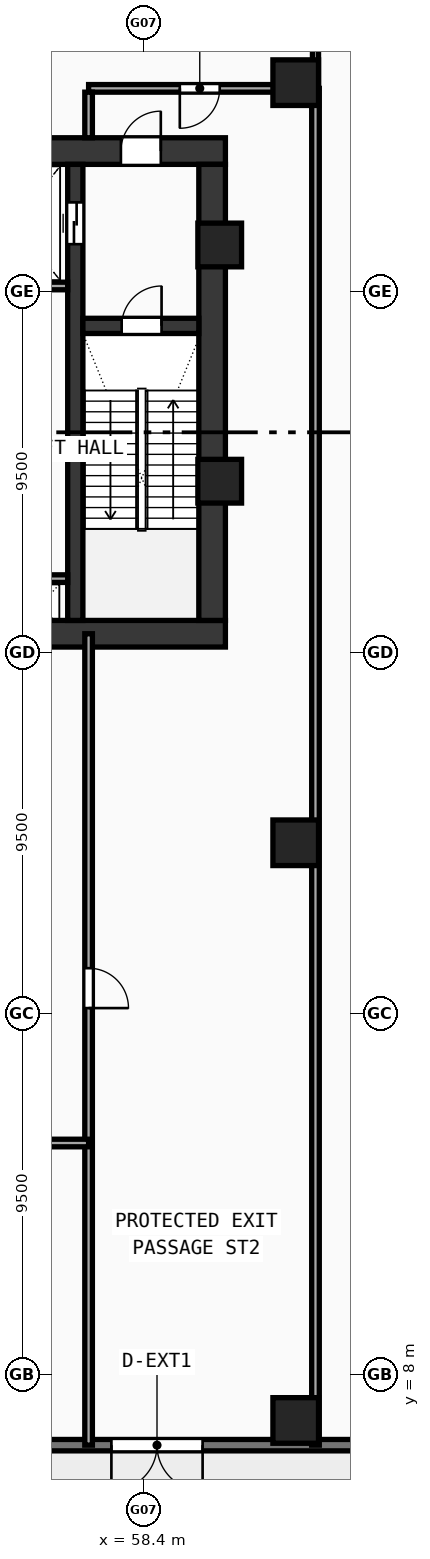
"""IFC4 building model, lengths in metres.
Left out: names, types, materials, properties, quantities, classifications, styles, units other than length and angle.
Written with IfcOpenShell. Run it as: python <this file> out.ifc"""

import sys

from ifc_helpers import new_model, si_unit, direction, frame, frame_2d, origin, origin_with_axes, origin_2d, place, context, subcontext, project, spatial, rectangle, hollow_rectangle, extrude, source, transform, mapped, element, fill, save


model = new_model("IFC4")
c1 = context("Model", 3, precision=1e-05, world=origin(), true_north=direction((0.0, 1.0)))
c2 = subcontext(c1, "Body", "Model", "MODEL_VIEW")
j1 = project(units=[si_unit("LENGTHUNIT", "METRE"), si_unit("PLANEANGLEUNIT", "RADIAN")], contexts=[c1])
p1 = place(None, origin())
s1 = spatial("IfcSite", under=j1, at=p1, CompositionType="ELEMENT")
p2 = place(p1, origin())
s2 = spatial("IfcBuilding", under=s1, at=p2, CompositionType="ELEMENT")
p3 = place(p2, origin())
s3 = spatial("IfcBuildingStorey", under=s2, at=p3, CompositionType="ELEMENT", Elevation=0.0)
p4 = place(p3, frame((35.45, 27.5, 0.0), z_axis=(0.0, 0.0, 1.0), x_axis=(1.0, 0.0, 0.0)))
e1 = element("IfcWall", 1, at=p4, inside=s3, PredefinedType="SHEAR", context=c2, shape_type="SweptSolid", body=[
    extrude(rectangle(XDim=25.1, YDim=0.7, at=frame_2d((12.55, 0.0))), origin(), (0.0, 0.0, 1.0), 4.52),
])
p5 = place(p3, frame((49.2, 40.2, 0.0), z_axis=(0.0, 0.0, 1.0), x_axis=(1.0, 0.0, 0.0)))
e2 = element("IfcWall", 2, at=p5, inside=s3, PredefinedType="SHEAR", context=c2, shape_type="SweptSolid", body=[
    extrude(rectangle(XDim=11.35, YDim=0.7, at=frame_2d((5.675, 0.0))), origin(), (0.0, 0.0, 1.0), 4.52),
])
p6 = place(p5, frame((8.6, 0.0, 0.0)))
e3 = element("IfcOpeningElement", 3, at=p6, cuts=e2, PredefinedType="OPENING", context=c2, shape_type="SweptSolid", body=[
    extrude(rectangle(XDim=1.05, YDim=2.1, at=frame_2d((0.525, 1.05))), frame((0.0, 0.36, 0.0), z_axis=(0.0, -1.0, 0.0), x_axis=(1.0, 0.0, 0.0)), (0.0, 0.0, 1.0), 0.72),
])
p7 = place(p3, frame((60.2, 27.85, 0.0), z_axis=(0.0, 0.0, 1.0), x_axis=(0.0, 1.0, 0.0)))
e4 = element("IfcWall", 4, at=p7, inside=s3, PredefinedType="SHEAR", context=c2, shape_type="SweptSolid", body=[
    extrude(rectangle(XDim=12.0, YDim=0.7, at=frame_2d((6.0, 0.0))), origin(), (0.0, 0.0, 1.0), 4.52),
])
p8 = place(p3, frame((56.6, 27.85, 0.0), z_axis=(0.0, 0.0, 1.0), x_axis=(0.0, 1.0, 0.0)))
e5 = element("IfcWall", 5, at=p8, inside=s3, PredefinedType="SHEAR", context=c2, shape_type="SweptSolid", body=[
    extrude(rectangle(XDim=12.0, YDim=0.4, at=frame_2d((6.0, 0.0))), origin(), (0.0, 0.0, 1.0), 4.52),
])
p9 = place(p8, frame((9.9, 0.0, 0.0)))
e6 = element("IfcOpeningElement", 6, at=p9, cuts=e5, PredefinedType="OPENING", context=c2, shape_type="SweptSolid", body=[
    extrude(rectangle(XDim=1.1, YDim=2.1, at=frame_2d((0.55, 1.05))), frame((0.0, 0.21, 0.0), z_axis=(0.0, -1.0, 0.0), x_axis=(1.0, 0.0, 0.0)), (0.0, 0.0, 1.0), 0.42),
])
p10 = place(p3, frame((56.8, 35.6, 0.0), z_axis=(0.0, 0.0, 1.0), x_axis=(1.0, 0.0, 0.0)))
e7 = element("IfcWall", 7, at=p10, inside=s3, PredefinedType="SHEAR", context=c2, shape_type="SweptSolid", body=[
    extrude(rectangle(XDim=3.05, YDim=0.4, at=frame_2d((1.525, 0.0))), origin(), (0.0, 0.0, 1.0), 4.52),
])
p11 = place(p10, frame((1.02, 0.0, 0.0)))
e8 = element("IfcOpeningElement", 8, at=p11, cuts=e7, PredefinedType="OPENING", context=c2, shape_type="SweptSolid", body=[
    extrude(rectangle(XDim=1.05, YDim=2.1, at=frame_2d((0.525, 1.05))), frame((0.0, 0.21, 0.0), z_axis=(0.0, -1.0, 0.0), x_axis=(1.0, 0.0, 0.0)), (0.0, 0.0, 1.0), 0.42),
])
m1 = source(origin(), c2, "Body", "SweptSolid", [
    extrude(hollow_rectangle(XDim=1.15, YDim=1.15, WallThickness=0.048, at=origin_2d()), origin(), (0.0, 0.0, 1.0), 4.8),
])
for number, where, z_axis, x_axis in (
    (9, (60.4, 31.513, -0.28), (0.0, 0.0, 1.0), (1.0, 0.0, 0.0)),
    (10, (60.4, 37.729, -0.28), (0.0, 0.0, 1.0), (1.0, 0.0, 0.0)),
):
    element("IfcColumn", number, at=place(p3, frame(where, z_axis=z_axis, x_axis=x_axis)), inside=s3, PredefinedType="COLUMN", context=c2, shape_type="MappedRepresentation", body=[
        mapped(m1, transform((0.0, 0.0, 0.0), scale=1.0)),
    ])
m2 = source(origin(), c2, "Body", "SweptSolid", [
    extrude(hollow_rectangle(XDim=1.2, YDim=1.2, WallThickness=0.05, at=origin_2d()), origin(), (0.0, 0.0, 1.0), 4.8),
])
for number, where, z_axis, x_axis in (
    (11, (62.4, 6.8, -0.28), (0.0, 0.0, 1.0), (1.0, 0.0, 0.0)),
    (12, (62.4, 22.0, -0.28), (0.0, 0.0, 1.0), (1.0, 0.0, 0.0)),
    (13, (62.4, 42.0, -0.28), (0.0, 0.0, 1.0), (1.0, 0.0, 0.0)),
):
    element("IfcColumn", number, at=place(p3, frame(where, z_axis=z_axis, x_axis=x_axis)), inside=s3, PredefinedType="COLUMN", context=c2, shape_type="MappedRepresentation", body=[
        mapped(m2, transform((0.0, 0.0, 0.0), scale=1.0)),
    ])
p12 = place(p3, frame((4.0, 6.15, 0.0), z_axis=(0.0, 0.0, 1.0), x_axis=(1.0, 0.0, 0.0)))
e14 = element("IfcWall", 14, at=p12, inside=s3, PredefinedType="STANDARD", context=c2, shape_type="SweptSolid", body=[
    extrude(rectangle(XDim=88.0, YDim=0.3, at=frame_2d((44.0, 0.0))), origin(), (0.0, 0.0, 1.0), 4.52),
])
p13 = place(p12, frame((32.05, 0.0, 0.0)))
e15 = element("IfcOpeningElement", 15, at=p13, cuts=e14, PredefinedType="OPENING", context=c2, shape_type="SweptSolid", body=[
    extrude(rectangle(XDim=2.4, YDim=2.2, at=frame_2d((1.2, 1.1))), frame((0.0, 0.16, 0.0), z_axis=(0.0, -1.0, 0.0), x_axis=(1.0, 0.0, 0.0)), (0.0, 0.0, 1.0), 0.32),
])
p14 = place(p12, frame((53.55, 0.0, 0.0)))
e16 = element("IfcOpeningElement", 16, at=p14, cuts=e14, PredefinedType="OPENING", context=c2, shape_type="SweptSolid", body=[
    extrude(rectangle(XDim=2.4, YDim=2.2, at=frame_2d((1.2, 1.1))), frame((0.0, 0.16, 0.0), z_axis=(0.0, -1.0, 0.0), x_axis=(1.0, 0.0, 0.0)), (0.0, 0.0, 1.0), 0.32),
])
p15 = place(p12, frame((68.0, 0.0, 0.0)))
e17 = element("IfcOpeningElement", 17, at=p15, cuts=e14, PredefinedType="OPENING", context=c2, shape_type="SweptSolid", body=[
    extrude(rectangle(XDim=2.4, YDim=2.2, at=frame_2d((1.2, 1.1))), frame((0.0, 0.16, 0.0), z_axis=(0.0, -1.0, 0.0), x_axis=(1.0, 0.0, 0.0)), (0.0, 0.0, 1.0), 0.32),
])
p16 = place(p12, frame((78.0, 0.0, 0.0)))
e18 = element("IfcOpeningElement", 18, at=p16, cuts=e14, PredefinedType="OPENING", context=c2, shape_type="SweptSolid", body=[
    extrude(rectangle(XDim=2.4, YDim=2.2, at=frame_2d((1.2, 1.1))), frame((0.0, 0.16, 0.0), z_axis=(0.0, -1.0, 0.0), x_axis=(1.0, 0.0, 0.0)), (0.0, 0.0, 1.0), 0.32),
])
p17 = place(p12, frame((9.0, 0.0, 0.9)))
e19 = element("IfcOpeningElement", 19, at=p17, cuts=e14, PredefinedType="OPENING", context=c2, shape_type="SweptSolid", body=[
    extrude(rectangle(XDim=2.4, YDim=1.8, at=frame_2d((1.2, 0.9))), frame((0.0, 0.16, 0.0), z_axis=(0.0, -1.0, 0.0), x_axis=(1.0, 0.0, 0.0)), (0.0, 0.0, 1.0), 0.32),
])
p18 = place(p12, frame((20.5, 0.0, 0.9)))
e20 = element("IfcOpeningElement", 20, at=p18, cuts=e14, PredefinedType="OPENING", context=c2, shape_type="SweptSolid", body=[
    extrude(rectangle(XDim=2.4, YDim=1.8, at=frame_2d((1.2, 0.9))), frame((0.0, 0.16, 0.0), z_axis=(0.0, -1.0, 0.0), x_axis=(1.0, 0.0, 0.0)), (0.0, 0.0, 1.0), 0.32),
])
p19 = place(p12, frame((39.0, 0.0, 0.9)))
e21 = element("IfcOpeningElement", 21, at=p19, cuts=e14, PredefinedType="OPENING", context=c2, shape_type="SweptSolid", body=[
    extrude(rectangle(XDim=2.4, YDim=1.8, at=frame_2d((1.2, 0.9))), frame((0.0, 0.16, 0.0), z_axis=(0.0, -1.0, 0.0), x_axis=(1.0, 0.0, 0.0)), (0.0, 0.0, 1.0), 0.32),
])
p20 = place(p12, frame((48.0, 0.0, 0.9)))
e22 = element("IfcOpeningElement", 22, at=p20, cuts=e14, PredefinedType="OPENING", context=c2, shape_type="SweptSolid", body=[
    extrude(rectangle(XDim=2.4, YDim=1.8, at=frame_2d((1.2, 0.9))), frame((0.0, 0.16, 0.0), z_axis=(0.0, -1.0, 0.0), x_axis=(1.0, 0.0, 0.0)), (0.0, 0.0, 1.0), 0.32),
])
p21 = place(p12, frame((61.5, 0.0, 0.9)))
e23 = element("IfcOpeningElement", 23, at=p21, cuts=e14, PredefinedType="OPENING", context=c2, shape_type="SweptSolid", body=[
    extrude(rectangle(XDim=2.4, YDim=1.8, at=frame_2d((1.2, 0.9))), frame((0.0, 0.16, 0.0), z_axis=(0.0, -1.0, 0.0), x_axis=(1.0, 0.0, 0.0)), (0.0, 0.0, 1.0), 0.32),
])
p22 = place(p3, frame((53.68, 36.65, 0.0), z_axis=(0.0, 0.0, 1.0), x_axis=(1.0, 0.0, 0.0)))
e24 = element("IfcWall", 24, at=p22, inside=s3, PredefinedType="SOLIDWALL", context=c2, shape_type="SweptSolid", body=[
    extrude(rectangle(XDim=2.72, YDim=0.2, at=frame_2d((1.36, 0.0))), origin(), (0.0, 0.0, 1.0), 4.52),
])
p23 = place(p3, frame((55.12, 28.95, 0.0), z_axis=(0.0, 0.0, 1.0), x_axis=(1.0, 0.0, 0.0)))
e25 = element("IfcWall", 25, at=p23, inside=s3, PredefinedType="SOLIDWALL", context=c2, shape_type="SweptSolid", body=[
    extrude(rectangle(XDim=1.28, YDim=0.2, at=frame_2d((0.64, 0.0))), origin(), (0.0, 0.0, 1.0), 4.52),
])
p24 = place(p3, frame((62.92, 6.15, 0.0), z_axis=(0.0, 0.0, 1.0), x_axis=(0.0, 1.0, 0.0)))
e26 = element("IfcWall", 26, at=p24, inside=s3, PredefinedType="SOLIDWALL", context=c2, shape_type="SweptSolid", body=[
    extrude(rectangle(XDim=35.7, YDim=0.2, at=frame_2d((17.85, 0.0))), origin(), (0.0, 0.0, 1.0), 3.62),
])
p25 = place(p3, frame((56.95, 41.85, 0.0), z_axis=(0.0, 0.0, 1.0), x_axis=(1.0, 0.0, 0.0)))
e27 = element("IfcWall", 27, at=p25, inside=s3, PredefinedType="SOLIDWALL", context=c2, shape_type="SweptSolid", body=[
    extrude(rectangle(XDim=5.97, YDim=0.2, at=frame_2d((2.985, 0.0))), origin(), (0.0, 0.0, 1.0), 3.62),
])
p26 = place(p25, frame((2.4, 0.0, 0.0)))
e28 = element("IfcOpeningElement", 28, at=p26, cuts=e27, PredefinedType="OPENING", context=c2, shape_type="SweptSolid", body=[
    extrude(rectangle(XDim=1.05, YDim=2.1, at=frame_2d((0.525, 1.05))), frame((0.0, 0.11, 0.0), z_axis=(0.0, -1.0, 0.0), x_axis=(1.0, 0.0, 0.0)), (0.0, 0.0, 1.0), 0.22),
])
p27 = place(p3, frame((56.95, 40.55, 0.0), z_axis=(0.0, 0.0, 1.0), x_axis=(0.0, 1.0, 0.0)))
e29 = element("IfcWall", 29, at=p27, inside=s3, PredefinedType="SOLIDWALL", context=c2, shape_type="SweptSolid", body=[
    extrude(rectangle(XDim=1.2, YDim=0.2, at=frame_2d((0.6, 0.0))), origin(), (0.0, 0.0, 1.0), 4.52),
])
p28 = place(p3, frame((56.95, 6.15, 0.0), z_axis=(0.0, 0.0, 1.0), x_axis=(0.0, 1.0, 0.0)))
e30 = element("IfcWall", 30, at=p28, inside=s3, PredefinedType="SOLIDWALL", context=c2, shape_type="SweptSolid", body=[
    extrude(rectangle(XDim=21.35, YDim=0.2, at=frame_2d((10.675, 0.0))), origin(), (0.0, 0.0, 1.0), 3.62),
])
p29 = place(p28, frame((11.5, 0.0, 0.0)))
e31 = element("IfcOpeningElement", 31, at=p29, cuts=e30, PredefinedType="OPENING", context=c2, shape_type="SweptSolid", body=[
    extrude(rectangle(XDim=1.05, YDim=2.1, at=frame_2d((0.525, 1.05))), frame((0.0, 0.11, 0.0), z_axis=(0.0, -1.0, 0.0), x_axis=(1.0, 0.0, 0.0)), (0.0, 0.0, 1.0), 0.22),
])
p30 = place(p3, frame((39.05, 14.1, 0.0), z_axis=(0.0, 0.0, 1.0), x_axis=(1.0, 0.0, 0.0)))
e32 = element("IfcWall", 32, at=p30, inside=s3, PredefinedType="SOLIDWALL", context=c2, shape_type="SweptSolid", body=[
    extrude(rectangle(XDim=17.9, YDim=0.2, at=frame_2d((8.95, 0.0))), origin(), (0.0, 0.0, 1.0), 4.52),
])
p31 = place(p30, frame((3.5, 0.0, 0.0)))
e33 = element("IfcOpeningElement", 33, at=p31, cuts=e32, PredefinedType="OPENING", context=c2, shape_type="SweptSolid", body=[
    extrude(rectangle(XDim=1.05, YDim=2.1, at=frame_2d((0.525, 1.05))), frame((0.0, 0.11, 0.0), z_axis=(0.0, -1.0, 0.0), x_axis=(1.0, 0.0, 0.0)), (0.0, 0.0, 1.0), 0.22),
])
p32 = place(p30, frame((12.5, 0.0, 0.0)))
e34 = element("IfcOpeningElement", 34, at=p32, cuts=e32, PredefinedType="OPENING", context=c2, shape_type="SweptSolid", body=[
    extrude(rectangle(XDim=0.92, YDim=2.1, at=frame_2d((0.46, 1.05))), frame((0.0, 0.11, 0.0), z_axis=(0.0, -1.0, 0.0), x_axis=(1.0, 0.0, 0.0)), (0.0, 0.0, 1.0), 0.22),
])
p33 = place(p3, frame((62.92, 41.85, 0.0), z_axis=(0.0, 0.0, 1.0), x_axis=(0.0, 1.0, 0.0)))
e35 = element("IfcWall", 35, at=p33, inside=s3, PredefinedType="PARTITIONING", context=c2, shape_type="SweptSolid", body=[
    extrude(rectangle(XDim=9.15, YDim=0.16, at=frame_2d((4.575, 0.0))), origin(), (0.0, 0.0, 1.0), 3.62),
])
p34 = place(p33, frame((3.5, 0.0, 0.0)))
e36 = element("IfcOpeningElement", 36, at=p34, cuts=e35, PredefinedType="OPENING", context=c2, shape_type="SweptSolid", body=[
    extrude(rectangle(XDim=1.1, YDim=2.15, at=frame_2d((0.55, 1.075))), frame((0.0, 0.09, 0.0), z_axis=(0.0, -1.0, 0.0), x_axis=(1.0, 0.0, 0.0)), (0.0, 0.0, 1.0), 0.18),
])
m3 = source(origin(), c2, "Body", "SweptSolid", [
    extrude(rectangle(XDim=2.4, YDim=2.2, at=frame_2d((1.2, 1.1))), frame((0.0, 0.025, 0.0), z_axis=(0.0, -1.0, 0.0), x_axis=(1.0, 0.0, 0.0)), (0.0, 0.0, 1.0), 0.05),
])
p35 = place(p14, frame((2.4, 0.0, 0.0), z_axis=(0.0, 0.0, 1.0), x_axis=(-1.0, 0.0, 0.0)))
e37 = element("IfcDoor", 37, at=p35, inside=s3, OperationType="DOUBLE_DOOR_SINGLE_SWING", PredefinedType="DOOR", context=c2, shape_type="MappedRepresentation", body=[
    mapped(m3, transform((0.0, 0.0, 0.0), scale=1.0)),
])
fill(e16, e37)
m4 = source(origin(), c2, "Body", "SweptSolid", [
    extrude(rectangle(XDim=1.05, YDim=2.1, at=frame_2d((0.525, 1.05))), frame((0.0, 0.025, 0.0), z_axis=(0.0, -1.0, 0.0), x_axis=(1.0, 0.0, 0.0)), (0.0, 0.0, 1.0), 0.05),
])
p36 = place(p11, origin_with_axes())
e38 = element("IfcDoor", 38, at=p36, inside=s3, OperationType="SINGLE_SWING_RIGHT", PredefinedType="DOOR", context=c2, shape_type="MappedRepresentation", body=[
    mapped(m4, transform((0.0, 0.0, 0.0), scale=1.0)),
])
fill(e8, e38)
p37 = place(p6, origin_with_axes())
e39 = element("IfcDoor", 39, at=p37, inside=s3, OperationType="SINGLE_SWING_RIGHT", PredefinedType="DOOR", context=c2, shape_type="MappedRepresentation", body=[
    mapped(m4, transform((0.0, 0.0, 0.0), scale=1.0)),
])
fill(e3, e39)
m5 = source(origin(), c2, "Body", "SweptSolid", [
    extrude(rectangle(XDim=1.1, YDim=2.1, at=frame_2d((0.55, 1.05))), frame((0.0, 0.025, 0.0), z_axis=(0.0, -1.0, 0.0), x_axis=(1.0, 0.0, 0.0)), (0.0, 0.0, 1.0), 0.05),
])
p38 = place(p9, origin_with_axes())
e40 = element("IfcDoor", 40, at=p38, inside=s3, OperationType="DOUBLE_DOOR_SLIDING", PredefinedType="DOOR", context=c2, shape_type="MappedRepresentation", body=[
    mapped(m5, transform((0.0, 0.0, 0.0), scale=1.0)),
])
fill(e6, e40)
p39 = place(p26, frame((1.05, 0.0, 0.0), z_axis=(0.0, 0.0, 1.0), x_axis=(-1.0, 0.0, 0.0)))
e41 = element("IfcDoor", 41, at=p39, inside=s3, OperationType="SINGLE_SWING_RIGHT", PredefinedType="DOOR", context=c2, shape_type="MappedRepresentation", body=[
    mapped(m4, transform((0.0, 0.0, 0.0), scale=1.0)),
])
fill(e28, e41)
p40 = place(p29, frame((1.05, 0.0, 0.0), z_axis=(0.0, 0.0, 1.0), x_axis=(-1.0, 0.0, 0.0)))
e42 = element("IfcDoor", 42, at=p40, inside=s3, OperationType="SINGLE_SWING_RIGHT", PredefinedType="DOOR", context=c2, shape_type="MappedRepresentation", body=[
    mapped(m4, transform((0.0, 0.0, 0.0), scale=1.0)),
])
fill(e31, e42)
save(model, sys.argv[1])
